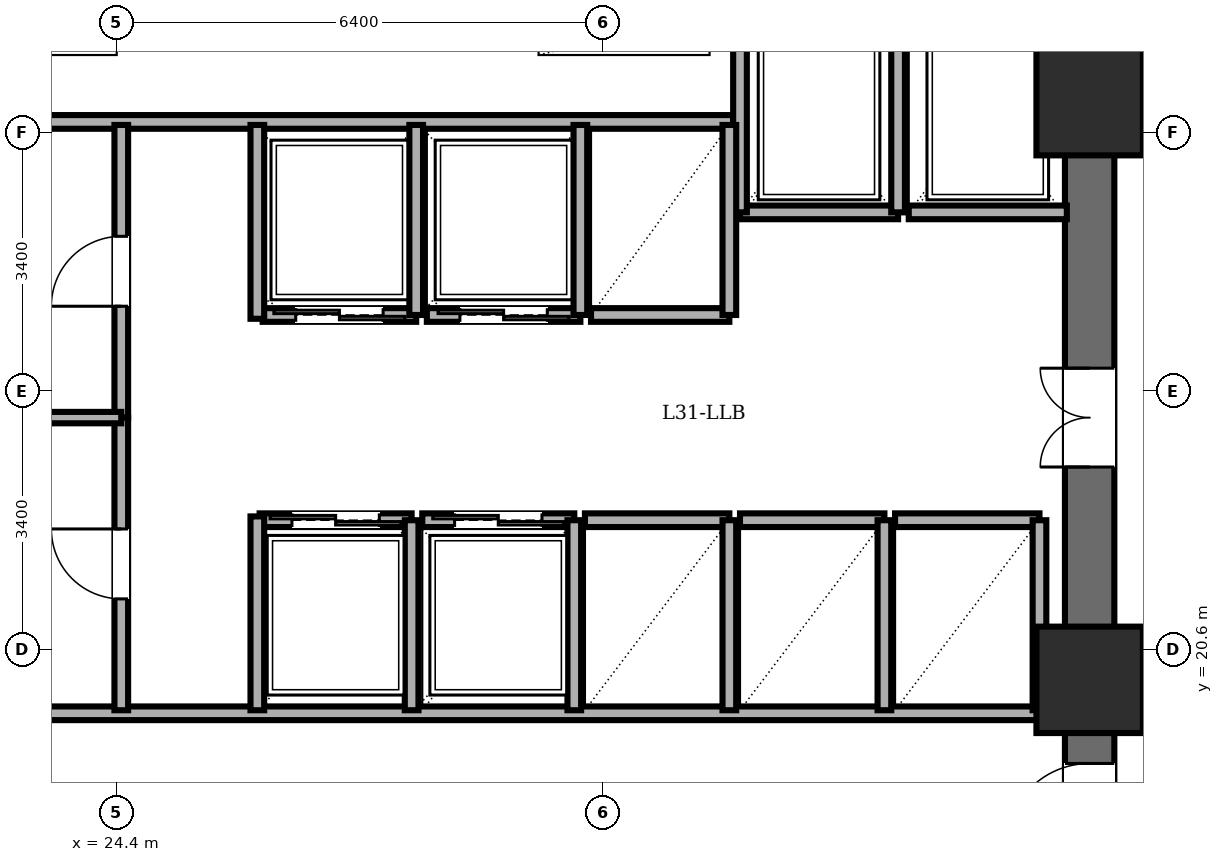
"""IFC4 building model, lengths in metres.
Left out: names, types, materials, properties, quantities, classifications, styles, units other than length and angle.
Written with IfcOpenShell. Run it as: python <this file> out.ifc"""

import sys

from ifc_helpers import new_model, si_unit, direction, frame, frame_2d, origin, origin_2d, place, context, subcontext, project, spatial, rectangle, extrude, element, fill, save


model = new_model("IFC4")
c1 = context("Model", 3, precision=1e-05, world=origin(), true_north=direction((0.0, 1.0)))
c2 = subcontext(c1, "Body", "Model", "MODEL_VIEW")
j1 = project(units=[si_unit("LENGTHUNIT", "METRE"), si_unit("PLANEANGLEUNIT", "RADIAN")], contexts=[c1])
p1 = place(None, origin())
s1 = spatial("IfcSite", under=j1, at=p1, CompositionType="ELEMENT")
p2 = place(p1, origin())
s2 = spatial("IfcBuilding", under=s1, at=p2, CompositionType="ELEMENT")
p3 = place(p2, frame((0.0, 0.0, 118.7)))
s3 = spatial("IfcBuildingStorey", under=s2, at=p3, CompositionType="ELEMENT", Elevation=118.7)
for number, where, z_axis, x_axis in (
    (1, (37.2, 20.2, 0.0), (0.0, 0.0, 1.0), (1.0, 0.0, 0.0)),
    (2, (37.2, 27.8, 0.0), (0.0, 0.0, 1.0), (1.0, 0.0, 0.0)),
):
    element("IfcColumn", number, at=place(p3, frame(where, z_axis=z_axis, x_axis=x_axis)), inside=s3, PredefinedType="COLUMN", context=c2, shape_type="SweptSolid", body=[
        extrude(rectangle(XDim=1.4, YDim=1.4, at=origin_2d()), origin(), (0.0, 0.0, 1.0), 3.6),
    ])
p4 = place(p3, frame((37.2, 14.4, 0.0), z_axis=(0.0, 0.0, 1.0), x_axis=(0.0, 1.0, 0.0)))
e3 = element("IfcWall", 3, at=p4, inside=s3, PredefinedType="SHEAR", context=c2, shape_type="SweptSolid", body=[
    extrude(rectangle(XDim=19.2, YDim=0.65, at=frame_2d((9.6, 0.0))), origin(), (0.0, 0.0, 1.0), 3.4),
])
p5 = place(p4, frame((15.8, 0.0, 0.0)))
e4 = element("IfcOpeningElement", 4, at=p5, cuts=e3, PredefinedType="OPENING", context=c2, shape_type="SweptSolid", body=[
    extrude(rectangle(XDim=1.15, YDim=2.15, at=frame_2d((0.575, 1.075))), frame((0.0, 0.335, 0.0), z_axis=(0.0, -1.0, 0.0), x_axis=(1.0, 0.0, 0.0)), (0.0, 0.0, 1.0), 0.67),
])
p6 = place(p4, frame((3.6, 0.0, 0.0)))
e5 = element("IfcOpeningElement", 5, at=p6, cuts=e3, PredefinedType="OPENING", context=c2, shape_type="SweptSolid", body=[
    extrude(rectangle(XDim=1.1, YDim=2.15, at=frame_2d((0.55, 1.075))), frame((0.0, 0.335, 0.0), z_axis=(0.0, -1.0, 0.0), x_axis=(1.0, 0.0, 0.0)), (0.0, 0.0, 1.0), 0.67),
])
p7 = place(p4, frame((8.6, 0.0, 0.0)))
e6 = element("IfcOpeningElement", 6, at=p7, cuts=e3, PredefinedType="OPENING", context=c2, shape_type="SweptSolid", body=[
    extrude(rectangle(XDim=1.3, YDim=2.2, at=frame_2d((0.65, 1.1))), frame((0.0, 0.335, 0.0), z_axis=(0.0, -1.0, 0.0), x_axis=(1.0, 0.0, 0.0)), (0.0, 0.0, 1.0), 0.67),
])
p8 = place(p3, frame((21.95, 27.54, 0.0), z_axis=(0.0, 0.0, 1.0), x_axis=(1.0, 0.0, 0.0)))
e7 = element("IfcWall", 7, at=p8, inside=s3, PredefinedType="PARTITIONING", context=c2, shape_type="SweptSolid", body=[
    extrude(rectangle(XDim=10.56, YDim=0.18, at=frame_2d((5.28, 0.0))), origin(), (0.0, 0.0, 1.0), 3.4),
])
p9 = place(p3, frame((21.95, 19.76, 0.0), z_axis=(0.0, 0.0, 1.0), x_axis=(1.0, 0.0, 0.0)))
e8 = element("IfcWall", 8, at=p9, inside=s3, PredefinedType="PARTITIONING", context=c2, shape_type="SweptSolid", body=[
    extrude(rectangle(XDim=14.87, YDim=0.18, at=frame_2d((7.435, 0.0))), origin(), (0.0, 0.0, 1.0), 3.4),
])
p10 = place(p3, frame((34.68, 26.35, 0.0), z_axis=(0.0, 0.0, 1.0), x_axis=(-1.0, 0.0, 0.0)))
e9 = element("IfcWall", 9, at=p10, inside=s3, PredefinedType="PARTITIONING", context=c2, shape_type="SweptSolid", body=[
    extrude(rectangle(XDim=2.08, YDim=0.18, at=frame_2d((1.04, 0.0))), origin(), (0.0, 0.0, 1.0), 3.4),
])
for number, where, z_axis, x_axis in (
    (10, (34.68, 26.35, 0.0), (0.0, 0.0, 1.0), (0.0, 1.0, 0.0)),
    (11, (32.6, 29.08, 0.0), (0.0, 0.0, 1.0), (0.0, -1.0, 0.0)),
):
    element("IfcWall", number, at=place(p3, frame(where, z_axis=z_axis, x_axis=x_axis)), inside=s3, PredefinedType="PARTITIONING", context=c2, shape_type="SweptSolid", body=[
        extrude(rectangle(XDim=2.73, YDim=0.18, at=frame_2d((1.365, 0.0))), origin(), (0.0, 0.0, 1.0), 3.4),
    ])
p11 = place(p3, frame((36.9, 26.35, 0.0), z_axis=(0.0, 0.0, 1.0), x_axis=(-1.0, 0.0, 0.0)))
e12 = element("IfcWall", 12, at=p11, inside=s3, PredefinedType="PARTITIONING", context=c2, shape_type="SweptSolid", body=[
    extrude(rectangle(XDim=2.08, YDim=0.18, at=frame_2d((1.04, 0.0))), origin(), (0.0, 0.0, 1.0), 3.4),
])
p12 = place(p3, frame((28.34, 25.0, 0.0), z_axis=(0.0, 0.0, 1.0), x_axis=(-1.0, 0.0, 0.0)))
e13 = element("IfcWall", 13, at=p12, inside=s3, PredefinedType="PARTITIONING", context=c2, shape_type="SweptSolid", body=[
    extrude(rectangle(XDim=2.02, YDim=0.18, at=frame_2d((1.01, 0.0))), origin(), (0.0, 0.0, 1.0), 3.4),
])
p13 = place(p12, frame((0.435, 0.0, 0.0)))
e14 = element("IfcOpeningElement", 14, at=p13, cuts=e13, PredefinedType="OPENING", context=c2, shape_type="SweptSolid", body=[
    extrude(rectangle(XDim=1.15, YDim=2.2, at=frame_2d((0.575, 1.1))), frame((0.0, 0.1, 0.0), z_axis=(0.0, -1.0, 0.0), x_axis=(1.0, 0.0, 0.0)), (0.0, 0.0, 1.0), 0.2),
])
p14 = place(p3, frame((28.34, 25.0, 0.0), z_axis=(0.0, 0.0, 1.0), x_axis=(0.0, 1.0, 0.0)))
e15 = element("IfcWall", 15, at=p14, inside=s3, PredefinedType="PARTITIONING", context=c2, shape_type="SweptSolid", body=[
    extrude(rectangle(XDim=2.5, YDim=0.18, at=frame_2d((1.25, 0.0))), origin(), (0.0, 0.0, 1.0), 3.4),
])
p15 = place(p3, frame((30.5, 25.0, 0.0), z_axis=(0.0, 0.0, 1.0), x_axis=(-1.0, 0.0, 0.0)))
e16 = element("IfcWall", 16, at=p15, inside=s3, PredefinedType="PARTITIONING", context=c2, shape_type="SweptSolid", body=[
    extrude(rectangle(XDim=2.02, YDim=0.18, at=frame_2d((1.01, 0.0))), origin(), (0.0, 0.0, 1.0), 3.4),
])
p16 = place(p15, frame((0.435, 0.0, 0.0)))
e17 = element("IfcOpeningElement", 17, at=p16, cuts=e16, PredefinedType="OPENING", context=c2, shape_type="SweptSolid", body=[
    extrude(rectangle(XDim=1.15, YDim=2.2, at=frame_2d((0.575, 1.1))), frame((0.0, 0.1, 0.0), z_axis=(0.0, -1.0, 0.0), x_axis=(1.0, 0.0, 0.0)), (0.0, 0.0, 1.0), 0.2),
])
p17 = place(p3, frame((30.5, 25.0, 0.0), z_axis=(0.0, 0.0, 1.0), x_axis=(0.0, 1.0, 0.0)))
e18 = element("IfcWall", 18, at=p17, inside=s3, PredefinedType="PARTITIONING", context=c2, shape_type="SweptSolid", body=[
    extrude(rectangle(XDim=2.5, YDim=0.18, at=frame_2d((1.25, 0.0))), origin(), (0.0, 0.0, 1.0), 3.4),
])
p18 = place(p3, frame((26.28, 22.3, 0.0), z_axis=(0.0, 0.0, 1.0), x_axis=(1.0, 0.0, 0.0)))
e19 = element("IfcWall", 19, at=p18, inside=s3, PredefinedType="PARTITIONING", context=c2, shape_type="SweptSolid", body=[
    extrude(rectangle(XDim=2.0, YDim=0.18, at=frame_2d((1.0, 0.0))), origin(), (0.0, 0.0, 1.0), 3.4),
])
p19 = place(p18, frame((0.425, 0.0, 0.0)))
e20 = element("IfcOpeningElement", 20, at=p19, cuts=e19, PredefinedType="OPENING", context=c2, shape_type="SweptSolid", body=[
    extrude(rectangle(XDim=1.15, YDim=2.2, at=frame_2d((0.575, 1.1))), frame((0.0, 0.1, 0.0), z_axis=(0.0, -1.0, 0.0), x_axis=(1.0, 0.0, 0.0)), (0.0, 0.0, 1.0), 0.2),
])
p20 = place(p3, frame((28.28, 19.8, 0.0), z_axis=(0.0, 0.0, 1.0), x_axis=(0.0, 1.0, 0.0)))
e21 = element("IfcWall", 21, at=p20, inside=s3, PredefinedType="PARTITIONING", context=c2, shape_type="SweptSolid", body=[
    extrude(rectangle(XDim=2.5, YDim=0.18, at=frame_2d((1.25, 0.0))), origin(), (0.0, 0.0, 1.0), 3.4),
])
p21 = place(p3, frame((28.42, 22.3, 0.0), z_axis=(0.0, 0.0, 1.0), x_axis=(1.0, 0.0, 0.0)))
e22 = element("IfcWall", 22, at=p21, inside=s3, PredefinedType="PARTITIONING", context=c2, shape_type="SweptSolid", body=[
    extrude(rectangle(XDim=2.0, YDim=0.18, at=frame_2d((1.0, 0.0))), origin(), (0.0, 0.0, 1.0), 3.4),
])
p22 = place(p21, frame((0.425, 0.0, 0.0)))
e23 = element("IfcOpeningElement", 23, at=p22, cuts=e22, PredefinedType="OPENING", context=c2, shape_type="SweptSolid", body=[
    extrude(rectangle(XDim=1.15, YDim=2.2, at=frame_2d((0.575, 1.1))), frame((0.0, 0.1, 0.0), z_axis=(0.0, -1.0, 0.0), x_axis=(1.0, 0.0, 0.0)), (0.0, 0.0, 1.0), 0.2),
])
p23 = place(p3, frame((30.42, 19.8, 0.0), z_axis=(0.0, 0.0, 1.0), x_axis=(0.0, 1.0, 0.0)))
e24 = element("IfcWall", 24, at=p23, inside=s3, PredefinedType="PARTITIONING", context=c2, shape_type="SweptSolid", body=[
    extrude(rectangle(XDim=2.5, YDim=0.18, at=frame_2d((1.25, 0.0))), origin(), (0.0, 0.0, 1.0), 3.4),
])
p24 = place(p3, frame((32.46, 25.0, 0.0), z_axis=(0.0, 0.0, 1.0), x_axis=(-1.0, 0.0, 0.0)))
e25 = element("IfcWall", 25, at=p24, inside=s3, PredefinedType="PARTITIONING", context=c2, shape_type="SweptSolid", body=[
    extrude(rectangle(XDim=1.82, YDim=0.18, at=frame_2d((0.91, 0.0))), origin(), (0.0, 0.0, 1.0), 3.4),
])
p25 = place(p3, frame((32.46, 25.0, 0.0), z_axis=(0.0, 0.0, 1.0), x_axis=(0.0, 1.0, 0.0)))
e26 = element("IfcWall", 26, at=p25, inside=s3, PredefinedType="PARTITIONING", context=c2, shape_type="SweptSolid", body=[
    extrude(rectangle(XDim=2.5, YDim=0.18, at=frame_2d((1.25, 0.0))), origin(), (0.0, 0.0, 1.0), 3.4),
])
p26 = place(p3, frame((30.56, 22.3, 0.0), z_axis=(0.0, 0.0, 1.0), x_axis=(1.0, 0.0, 0.0)))
e27 = element("IfcWall", 27, at=p26, inside=s3, PredefinedType="PARTITIONING", context=c2, shape_type="SweptSolid", body=[
    extrude(rectangle(XDim=1.9, YDim=0.18, at=frame_2d((0.95, 0.0))), origin(), (0.0, 0.0, 1.0), 3.4),
])
p27 = place(p3, frame((32.46, 19.8, 0.0), z_axis=(0.0, 0.0, 1.0), x_axis=(0.0, 1.0, 0.0)))
e28 = element("IfcWall", 28, at=p27, inside=s3, PredefinedType="PARTITIONING", context=c2, shape_type="SweptSolid", body=[
    extrude(rectangle(XDim=2.5, YDim=0.18, at=frame_2d((1.25, 0.0))), origin(), (0.0, 0.0, 1.0), 3.4),
])
p28 = place(p3, frame((32.6, 22.3, 0.0), z_axis=(0.0, 0.0, 1.0), x_axis=(1.0, 0.0, 0.0)))
e29 = element("IfcWall", 29, at=p28, inside=s3, PredefinedType="PARTITIONING", context=c2, shape_type="SweptSolid", body=[
    extrude(rectangle(XDim=1.9, YDim=0.18, at=frame_2d((0.95, 0.0))), origin(), (0.0, 0.0, 1.0), 3.4),
])
p29 = place(p3, frame((34.5, 19.8, 0.0), z_axis=(0.0, 0.0, 1.0), x_axis=(0.0, 1.0, 0.0)))
e30 = element("IfcWall", 30, at=p29, inside=s3, PredefinedType="PARTITIONING", context=c2, shape_type="SweptSolid", body=[
    extrude(rectangle(XDim=2.5, YDim=0.18, at=frame_2d((1.25, 0.0))), origin(), (0.0, 0.0, 1.0), 3.4),
])
p30 = place(p3, frame((34.64, 22.3, 0.0), z_axis=(0.0, 0.0, 1.0), x_axis=(1.0, 0.0, 0.0)))
e31 = element("IfcWall", 31, at=p30, inside=s3, PredefinedType="PARTITIONING", context=c2, shape_type="SweptSolid", body=[
    extrude(rectangle(XDim=1.9, YDim=0.18, at=frame_2d((0.95, 0.0))), origin(), (0.0, 0.0, 1.0), 3.4),
])
p31 = place(p3, frame((36.54, 19.8, 0.0), z_axis=(0.0, 0.0, 1.0), x_axis=(0.0, 1.0, 0.0)))
e32 = element("IfcWall", 32, at=p31, inside=s3, PredefinedType="PARTITIONING", context=c2, shape_type="SweptSolid", body=[
    extrude(rectangle(XDim=2.5, YDim=0.18, at=frame_2d((1.25, 0.0))), origin(), (0.0, 0.0, 1.0), 3.4),
])
p32 = place(p3, frame((24.46, 23.65, 0.0), z_axis=(0.0, 0.0, 1.0), x_axis=(0.0, 1.0, 0.0)))
e33 = element("IfcWall", 33, at=p32, inside=s3, PredefinedType="PARTITIONING", context=c2, shape_type="SweptSolid", body=[
    extrude(rectangle(XDim=3.85, YDim=0.18, at=frame_2d((1.925, 0.0))), origin(), (0.0, 0.0, 1.0), 3.4),
])
p33 = place(p32, frame((1.465, 0.0, 0.0)))
e34 = element("IfcOpeningElement", 34, at=p33, cuts=e33, PredefinedType="OPENING", context=c2, shape_type="SweptSolid", body=[
    extrude(rectangle(XDim=0.92, YDim=2.1, at=frame_2d((0.46, 1.05))), frame((0.0, 0.1, 0.0), z_axis=(0.0, -1.0, 0.0), x_axis=(1.0, 0.0, 0.0)), (0.0, 0.0, 1.0), 0.2),
])
p34 = place(p3, frame((24.46, 19.8, 0.0), z_axis=(0.0, 0.0, 1.0), x_axis=(0.0, 1.0, 0.0)))
e35 = element("IfcWall", 35, at=p34, inside=s3, PredefinedType="PARTITIONING", context=c2, shape_type="SweptSolid", body=[
    extrude(rectangle(XDim=3.85, YDim=0.18, at=frame_2d((1.925, 0.0))), origin(), (0.0, 0.0, 1.0), 3.4),
])
p35 = place(p34, frame((1.465, 0.0, 0.0)))
e36 = element("IfcOpeningElement", 36, at=p35, cuts=e35, PredefinedType="OPENING", context=c2, shape_type="SweptSolid", body=[
    extrude(rectangle(XDim=0.92, YDim=2.1, at=frame_2d((0.46, 1.05))), frame((0.0, 0.1, 0.0), z_axis=(0.0, -1.0, 0.0), x_axis=(1.0, 0.0, 0.0)), (0.0, 0.0, 1.0), 0.2),
])
p36 = place(p3, frame((21.95, 23.65, 0.0), z_axis=(0.0, 0.0, 1.0), x_axis=(1.0, 0.0, 0.0)))
e37 = element("IfcWall", 37, at=p36, inside=s3, PredefinedType="PARTITIONING", context=c2, shape_type="SweptSolid", body=[
    extrude(rectangle(XDim=2.51, YDim=0.15, at=frame_2d((1.255, 0.0))), origin(), (0.0, 0.0, 1.0), 3.4),
])
for number, where, z_axis, x_axis in (
    (38, (26.25, 24.95, 0.0), (0.0, 0.0, 1.0), (0.0, 1.0, 0.0)),
    (39, (26.25, 19.8, 0.0), (0.0, 0.0, 1.0), (0.0, 1.0, 0.0)),
):
    element("IfcWall", number, at=place(p3, frame(where, z_axis=z_axis, x_axis=x_axis)), inside=s3, PredefinedType="PARTITIONING", context=c2, shape_type="SweptSolid", body=[
        extrude(rectangle(XDim=2.55, YDim=0.18, at=frame_2d((1.275, 0.0))), origin(), (0.0, 0.0, 1.0), 3.4),
    ])
p37 = place(p6, origin())
e40 = element("IfcDoor", 40, at=p37, inside=s3, OperationType="SINGLE_SWING_LEFT", PredefinedType="DOOR", context=c2, shape_type="SweptSolid", body=[
    extrude(rectangle(XDim=1.1, YDim=2.15, at=frame_2d((0.55, 1.075))), frame((0.0, 0.025, 0.0), z_axis=(0.0, -1.0, 0.0), x_axis=(1.0, 0.0, 0.0)), (0.0, 0.0, 1.0), 0.05),
])
fill(e5, e40)
p38 = place(p13, origin())
e41 = element("IfcDoor", 41, at=p38, inside=s3, OperationType="DOUBLE_DOOR_SLIDING", PredefinedType="DOOR", context=c2, shape_type="SweptSolid", body=[
    extrude(rectangle(XDim=1.15, YDim=2.2, at=frame_2d((0.575, 1.1))), frame((0.0, 0.025, 0.0), z_axis=(0.0, -1.0, 0.0), x_axis=(1.0, 0.0, 0.0)), (0.0, 0.0, 1.0), 0.05),
])
fill(e14, e41)
p39 = place(p16, origin())
e42 = element("IfcDoor", 42, at=p39, inside=s3, OperationType="DOUBLE_DOOR_SLIDING", PredefinedType="DOOR", context=c2, shape_type="SweptSolid", body=[
    extrude(rectangle(XDim=1.15, YDim=2.2, at=frame_2d((0.575, 1.1))), frame((0.0, 0.025, 0.0), z_axis=(0.0, -1.0, 0.0), x_axis=(1.0, 0.0, 0.0)), (0.0, 0.0, 1.0), 0.05),
])
fill(e17, e42)
p40 = place(p19, origin())
e43 = element("IfcDoor", 43, at=p40, inside=s3, OperationType="DOUBLE_DOOR_SLIDING", PredefinedType="DOOR", context=c2, shape_type="SweptSolid", body=[
    extrude(rectangle(XDim=1.15, YDim=2.2, at=frame_2d((0.575, 1.1))), frame((0.0, 0.025, 0.0), z_axis=(0.0, -1.0, 0.0), x_axis=(1.0, 0.0, 0.0)), (0.0, 0.0, 1.0), 0.05),
])
fill(e20, e43)
p41 = place(p22, origin())
e44 = element("IfcDoor", 44, at=p41, inside=s3, OperationType="DOUBLE_DOOR_SLIDING", PredefinedType="DOOR", context=c2, shape_type="SweptSolid", body=[
    extrude(rectangle(XDim=1.15, YDim=2.2, at=frame_2d((0.575, 1.1))), frame((0.0, 0.025, 0.0), z_axis=(0.0, -1.0, 0.0), x_axis=(1.0, 0.0, 0.0)), (0.0, 0.0, 1.0), 0.05),
])
fill(e23, e44)
p42 = place(p33, origin())
e45 = element("IfcDoor", 45, at=p42, inside=s3, OperationType="SINGLE_SWING_LEFT", PredefinedType="DOOR", context=c2, shape_type="SweptSolid", body=[
    extrude(rectangle(XDim=0.92, YDim=2.1, at=frame_2d((0.46, 1.05))), frame((0.0, 0.025, 0.0), z_axis=(0.0, -1.0, 0.0), x_axis=(1.0, 0.0, 0.0)), (0.0, 0.0, 1.0), 0.05),
])
fill(e34, e45)
p43 = place(p35, origin())
e46 = element("IfcDoor", 46, at=p43, inside=s3, OperationType="SINGLE_SWING_RIGHT", PredefinedType="DOOR", context=c2, shape_type="SweptSolid", body=[
    extrude(rectangle(XDim=0.92, YDim=2.1, at=frame_2d((0.46, 1.05))), frame((0.0, 0.025, 0.0), z_axis=(0.0, -1.0, 0.0), x_axis=(1.0, 0.0, 0.0)), (0.0, 0.0, 1.0), 0.05),
])
fill(e36, e46)
p44 = place(p7, origin())
e47 = element("IfcDoor", 47, at=p44, inside=s3, OperationType="DOUBLE_DOOR_SINGLE_SWING", PredefinedType="DOOR", context=c2, shape_type="SweptSolid", body=[
    extrude(rectangle(XDim=1.3, YDim=2.2, at=frame_2d((0.65, 1.1))), frame((0.0, 0.025, 0.0), z_axis=(0.0, -1.0, 0.0), x_axis=(1.0, 0.0, 0.0)), (0.0, 0.0, 1.0), 0.05),
])
fill(e6, e47)
save(model, sys.argv[1])
